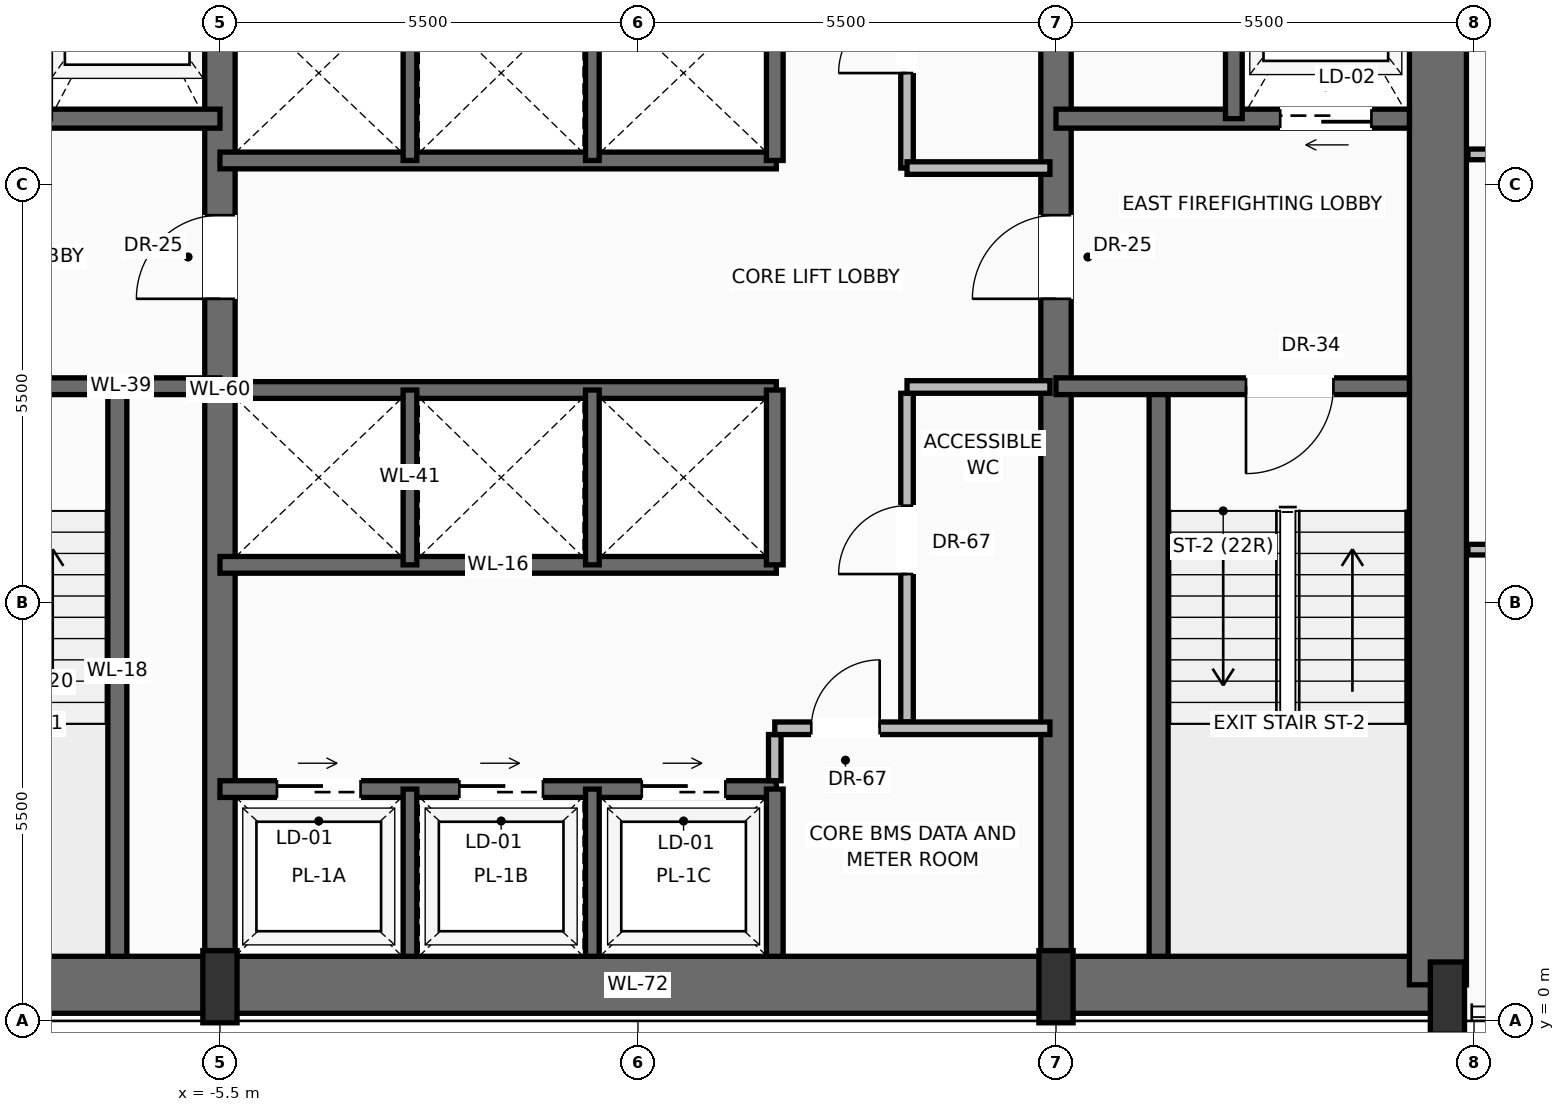
"""IFC4 building model, lengths in metres.
Left out: names, types, materials, properties, quantities, classifications, styles, units other than length and angle.
Written with IfcOpenShell. Run it as: python <this file> out.ifc"""

import sys

from ifc_helpers import new_model, si_unit, direction, frame, frame_2d, origin, origin_2d, place, context, subcontext, project, spatial, rectangle, extrude, source, transform, mapped, element, fill, save


model = new_model("IFC4")
c1 = context("Model", 3, precision=1e-05, world=origin(), true_north=direction((0.0, 1.0)))
c2 = subcontext(c1, "Body", "Model", "MODEL_VIEW")
j1 = project(units=[si_unit("LENGTHUNIT", "METRE"), si_unit("PLANEANGLEUNIT", "RADIAN")], contexts=[c1])
p1 = place(None, origin())
s1 = spatial("IfcSite", under=j1, at=p1, CompositionType="ELEMENT")
p2 = place(p1, origin())
s2 = spatial("IfcBuilding", under=s1, at=p2, CompositionType="ELEMENT")
p3 = place(p2, frame((0.0, 0.0, 87.7)))
s3 = spatial("IfcBuildingStorey", under=s2, at=p3, CompositionType="ELEMENT", Elevation=87.7)
p4 = place(p3, frame((-10.65, 0.475, 0.0), z_axis=(0.0, 0.0, 1.0), x_axis=(1.0, 0.0, 0.0)))
e1 = element("IfcWall", 1, at=p4, inside=s3, PredefinedType="SHEAR", context=c2, shape_type="SweptSolid", body=[
    extrude(rectangle(XDim=21.3, YDim=0.75, at=frame_2d((10.65, 0.0))), origin(), (0.0, 0.0, 1.0), 3.45),
])
p5 = place(p3, frame((10.525, 0.475, 0.0), z_axis=(0.0, 0.0, 1.0), x_axis=(0.0, 1.0, 0.0)))
e2 = element("IfcWall", 2, at=p5, inside=s3, PredefinedType="SHEAR", context=c2, shape_type="SweptSolid", body=[
    extrude(rectangle(XDim=15.65, YDim=0.75, at=frame_2d((7.825, 0.0))), origin(), (0.0, 0.0, 1.0), 3.45),
])
p6 = place(p3, frame((-5.5, 0.475, 0.0), z_axis=(0.0, 0.0, 1.0), x_axis=(0.0, 1.0, 0.0)))
e3 = element("IfcWall", 3, at=p6, inside=s3, PredefinedType="SHEAR", context=c2, shape_type="SweptSolid", body=[
    extrude(rectangle(XDim=15.65, YDim=0.4, at=frame_2d((7.825, 0.0))), origin(), (0.0, 0.0, 1.0), 3.45),
])
p7 = place(p6, frame((9.025, 0.0, 0.0)))
e4 = element("IfcOpeningElement", 4, at=p7, cuts=e3, PredefinedType="OPENING", context=c2, shape_type="SweptSolid", body=[
    extrude(rectangle(XDim=1.1, YDim=2.2, at=frame_2d((0.55, 1.1))), frame((0.0, 0.21, 0.0), z_axis=(0.0, -1.0, 0.0), x_axis=(1.0, 0.0, 0.0)), (0.0, 0.0, 1.0), 0.42),
])
p8 = place(p3, frame((5.5, 0.475, 0.0), z_axis=(0.0, 0.0, 1.0), x_axis=(0.0, 1.0, 0.0)))
e5 = element("IfcWall", 5, at=p8, inside=s3, PredefinedType="SHEAR", context=c2, shape_type="SweptSolid", body=[
    extrude(rectangle(XDim=15.65, YDim=0.4, at=frame_2d((7.825, 0.0))), origin(), (0.0, 0.0, 1.0), 3.45),
])
p9 = place(p8, frame((9.025, 0.0, 0.0)))
e6 = element("IfcOpeningElement", 6, at=p9, cuts=e5, PredefinedType="OPENING", context=c2, shape_type="SweptSolid", body=[
    extrude(rectangle(XDim=1.1, YDim=2.2, at=frame_2d((0.55, 1.1))), frame((0.0, 0.21, 0.0), z_axis=(0.0, -1.0, 0.0), x_axis=(1.0, 0.0, 0.0)), (0.0, 0.0, 1.0), 0.42),
])
m1 = source(origin(), c2, "Body", "SweptSolid", [
    extrude(rectangle(XDim=0.45, YDim=0.95, at=origin_2d()), origin(), (0.0, 0.0, 1.0), 3.7),
])
for number, where, z_axis, x_axis in (
    (7, (-5.5, 0.45, 0.0), (0.0, 0.0, 1.0), (1.0, 0.0, 0.0)),
    (8, (5.5, 0.45, 0.0), (0.0, 0.0, 1.0), (1.0, 0.0, 0.0)),
    (9, (10.65, 0.3, 0.0), (0.0, 0.0, 1.0), (1.0, 0.0, 0.0)),
):
    element("IfcColumn", number, at=place(p3, frame(where, z_axis=z_axis, x_axis=x_axis)), inside=s3, PredefinedType="PILASTER", context=c2, shape_type="MappedRepresentation", body=[
        mapped(m1, transform((0.0, 0.0, 0.0), scale=1.0)),
    ])
p10 = place(p3, frame((-6.85, 0.85, 0.0), z_axis=(0.0, 0.0, 1.0), x_axis=(0.0, 1.0, 0.0)))
e10 = element("IfcWall", 10, at=p10, inside=s3, PredefinedType="SOLIDWALL", context=c2, shape_type="SweptSolid", body=[
    extrude(rectangle(XDim=7.5, YDim=0.25, at=frame_2d((3.75, 0.0))), origin(), (0.0, 0.0, 1.0), 3.45),
])
p11 = place(p3, frame((-5.5, 8.35, 0.0), z_axis=(0.0, 0.0, 1.0), x_axis=(-1.0, 0.0, 0.0)))
e11 = element("IfcWall", 11, at=p11, inside=s3, PredefinedType="SOLIDWALL", context=c2, shape_type="SweptSolid", body=[
    extrude(rectangle(XDim=4.65, YDim=0.22, at=frame_2d((2.325, 0.0))), origin(), (0.0, 0.0, 1.0), 3.45),
])
p12 = place(p11, frame((2.5, 0.0, 0.0)))
e12 = element("IfcOpeningElement", 12, at=p12, cuts=e11, PredefinedType="OPENING", context=c2, shape_type="SweptSolid", body=[
    extrude(rectangle(XDim=1.15, YDim=2.2, at=frame_2d((0.575, 1.1))), frame((0.0, 0.12, 0.0), z_axis=(0.0, -1.0, 0.0), x_axis=(1.0, 0.0, 0.0)), (0.0, 0.0, 1.0), 0.24),
])
p13 = place(p3, frame((-5.5, 11.87, 0.0), z_axis=(0.0, 0.0, 1.0), x_axis=(-1.0, 0.0, 0.0)))
e13 = element("IfcWall", 13, at=p13, inside=s3, PredefinedType="SOLIDWALL", context=c2, shape_type="SweptSolid", body=[
    extrude(rectangle(XDim=4.65, YDim=0.25, at=frame_2d((2.325, 0.0))), origin(), (0.0, 0.0, 1.0), 3.45),
])
p14 = place(p13, frame((2.95, 0.0, 0.0)))
e14 = element("IfcOpeningElement", 14, at=p14, cuts=e13, PredefinedType="OPENING", context=c2, shape_type="SweptSolid", body=[
    extrude(rectangle(XDim=1.2, YDim=2.25, at=frame_2d((0.6, 1.125))), frame((0.0, 0.135, 0.0), z_axis=(0.0, -1.0, 0.0), x_axis=(1.0, 0.0, 0.0)), (0.0, 0.0, 1.0), 0.27),
])
p15 = place(p3, frame((6.85, 0.85, 0.0), z_axis=(0.0, 0.0, 1.0), x_axis=(0.0, 1.0, 0.0)))
e15 = element("IfcWall", 15, at=p15, inside=s3, PredefinedType="SOLIDWALL", context=c2, shape_type="SweptSolid", body=[
    extrude(rectangle(XDim=7.5, YDim=0.25, at=frame_2d((3.75, 0.0))), origin(), (0.0, 0.0, 1.0), 3.45),
])
p16 = place(p3, frame((10.15, 8.35, 0.0), z_axis=(0.0, 0.0, 1.0), x_axis=(-1.0, 0.0, 0.0)))
e16 = element("IfcWall", 16, at=p16, inside=s3, PredefinedType="SOLIDWALL", context=c2, shape_type="SweptSolid", body=[
    extrude(rectangle(XDim=4.65, YDim=0.22, at=frame_2d((2.325, 0.0))), origin(), (0.0, 0.0, 1.0), 3.45),
])
p17 = place(p16, frame((1.0, 0.0, 0.0)))
e17 = element("IfcOpeningElement", 17, at=p17, cuts=e16, PredefinedType="OPENING", context=c2, shape_type="SweptSolid", body=[
    extrude(rectangle(XDim=1.15, YDim=2.2, at=frame_2d((0.575, 1.1))), frame((0.0, 0.12, 0.0), z_axis=(0.0, -1.0, 0.0), x_axis=(1.0, 0.0, 0.0)), (0.0, 0.0, 1.0), 0.24),
])
p18 = place(p3, frame((10.15, 11.87, 0.0), z_axis=(0.0, 0.0, 1.0), x_axis=(-1.0, 0.0, 0.0)))
e18 = element("IfcWall", 18, at=p18, inside=s3, PredefinedType="SOLIDWALL", context=c2, shape_type="SweptSolid", body=[
    extrude(rectangle(XDim=4.65, YDim=0.25, at=frame_2d((2.325, 0.0))), origin(), (0.0, 0.0, 1.0), 3.45),
])
p19 = place(p18, frame((0.5, 0.0, 0.0)))
e19 = element("IfcOpeningElement", 19, at=p19, cuts=e18, PredefinedType="OPENING", context=c2, shape_type="SweptSolid", body=[
    extrude(rectangle(XDim=1.2, YDim=2.25, at=frame_2d((0.6, 1.125))), frame((0.0, 0.135, 0.0), z_axis=(0.0, -1.0, 0.0), x_axis=(1.0, 0.0, 0.0)), (0.0, 0.0, 1.0), 0.27),
])
p20 = place(p3, frame((7.84, 11.87, 0.0), z_axis=(0.0, 0.0, 1.0), x_axis=(0.0, 1.0, 0.0)))
e20 = element("IfcWall", 20, at=p20, inside=s3, PredefinedType="SOLIDWALL", context=c2, shape_type="SweptSolid", body=[
    extrude(rectangle(XDim=3.88, YDim=0.22, at=frame_2d((1.94, 0.0))), origin(), (0.0, 0.0, 1.0), 3.45),
])
p21 = place(p3, frame((-5.5, 3.05, 0.0), z_axis=(0.0, 0.0, 1.0), x_axis=(1.0, 0.0, 0.0)))
e21 = element("IfcWall", 21, at=p21, inside=s3, PredefinedType="SOLIDWALL", context=c2, shape_type="SweptSolid", body=[
    extrude(rectangle(XDim=7.32, YDim=0.22, at=frame_2d((3.66, 0.0))), origin(), (0.0, 0.0, 1.0), 3.45),
])
p22 = place(p21, frame((0.75, 0.0, 0.0)))
e22 = element("IfcOpeningElement", 22, at=p22, cuts=e21, PredefinedType="OPENING", context=c2, shape_type="SweptSolid", body=[
    extrude(rectangle(XDim=1.1, YDim=2.2, at=frame_2d((0.55, 1.1))), frame((0.0, 0.12, 0.0), z_axis=(0.0, -1.0, 0.0), x_axis=(1.0, 0.0, 0.0)), (0.0, 0.0, 1.0), 0.24),
])
p23 = place(p21, frame((3.15, 0.0, 0.0)))
e23 = element("IfcOpeningElement", 23, at=p23, cuts=e21, PredefinedType="OPENING", context=c2, shape_type="SweptSolid", body=[
    extrude(rectangle(XDim=1.1, YDim=2.2, at=frame_2d((0.55, 1.1))), frame((0.0, 0.12, 0.0), z_axis=(0.0, -1.0, 0.0), x_axis=(1.0, 0.0, 0.0)), (0.0, 0.0, 1.0), 0.24),
])
p24 = place(p21, frame((5.55, 0.0, 0.0)))
e24 = element("IfcOpeningElement", 24, at=p24, cuts=e21, PredefinedType="OPENING", context=c2, shape_type="SweptSolid", body=[
    extrude(rectangle(XDim=1.1, YDim=2.2, at=frame_2d((0.55, 1.1))), frame((0.0, 0.12, 0.0), z_axis=(0.0, -1.0, 0.0), x_axis=(1.0, 0.0, 0.0)), (0.0, 0.0, 1.0), 0.24),
])
p25 = place(p3, frame((1.8, 0.85, 0.0), z_axis=(0.0, 0.0, 1.0), x_axis=(0.0, 1.0, 0.0)))
e25 = element("IfcWall", 25, at=p25, inside=s3, PredefinedType="SOLIDWALL", context=c2, shape_type="SweptSolid", body=[
    extrude(rectangle(XDim=2.2, YDim=0.22, at=frame_2d((1.1, 0.0))), origin(), (0.0, 0.0, 1.0), 3.45),
])
for number, where, z_axis, x_axis in (
    (26, (-3.0, 0.85, 0.0), (0.0, 0.0, 1.0), (0.0, 1.0, 0.0)),
    (27, (-0.6, 0.85, 0.0), (0.0, 0.0, 1.0), (0.0, 1.0, 0.0)),
):
    element("IfcWall", number, at=place(p3, frame(where, z_axis=z_axis, x_axis=x_axis)), inside=s3, PredefinedType="SOLIDWALL", context=c2, shape_type="SweptSolid", body=[
        extrude(rectangle(XDim=2.2, YDim=0.18, at=frame_2d((1.1, 0.0))), origin(), (0.0, 0.0, 1.0), 3.45),
    ])
p26 = place(p3, frame((1.8, 3.16, 0.0), z_axis=(0.0, 0.0, 1.0), x_axis=(0.0, 1.0, 0.0)))
e28 = element("IfcWall", 28, at=p26, inside=s3, PredefinedType="PARTITIONING", context=c2, shape_type="SweptSolid", body=[
    extrude(rectangle(XDim=0.608, YDim=0.165, at=frame_2d((0.304, 0.0))), origin(), (0.0, 0.0, 1.0), 3.442),
])
p27 = place(p3, frame((3.54, 3.933, 0.0), z_axis=(0.0, 0.0, 1.0), x_axis=(0.0, 1.0, 0.0)))
e29 = element("IfcWall", 29, at=p27, inside=s3, PredefinedType="PARTITIONING", context=c2, shape_type="SweptSolid", body=[
    extrude(rectangle(XDim=4.325, YDim=0.165, at=frame_2d((2.163, 0.0))), origin(), (0.0, 0.0, 1.0), 3.442),
])
p28 = place(p27, frame((1.946, 0.0, 0.0)))
e30 = element("IfcOpeningElement", 30, at=p28, cuts=e29, PredefinedType="OPENING", context=c2, shape_type="SweptSolid", body=[
    extrude(rectangle(XDim=0.9, YDim=2.1, at=frame_2d((0.45, 1.05))), frame((0.0, 0.093, 0.0), z_axis=(0.0, -1.0, 0.0), x_axis=(1.0, 0.0, 0.0)), (0.0, 0.0, 1.0), 0.185),
])
p29 = place(p3, frame((3.54, 8.34, 0.0), z_axis=(0.0, 0.0, 1.0), x_axis=(1.0, 0.0, 0.0)))
e31 = element("IfcWall", 31, at=p29, inside=s3, PredefinedType="PARTITIONING", context=c2, shape_type="SweptSolid", body=[
    extrude(rectangle(XDim=1.88, YDim=0.165, at=frame_2d((0.94, 0.0))), origin(), (0.0, 0.0, 1.0), 3.442),
])
p30 = place(p3, frame((1.8, 3.85, 0.0), z_axis=(0.0, 0.0, 1.0), x_axis=(1.0, 0.0, 0.0)))
e32 = element("IfcWall", 32, at=p30, inside=s3, PredefinedType="PARTITIONING", context=c2, shape_type="SweptSolid", body=[
    extrude(rectangle(XDim=3.62, YDim=0.165, at=frame_2d((1.81, 0.0))), origin(), (0.0, 0.0, 1.0), 3.442),
])
p31 = place(p30, frame((0.48, 0.0, 0.0)))
e33 = element("IfcOpeningElement", 33, at=p31, cuts=e32, PredefinedType="OPENING", context=c2, shape_type="SweptSolid", body=[
    extrude(rectangle(XDim=0.9, YDim=2.1, at=frame_2d((0.45, 1.05))), frame((0.0, 0.093, 0.0), z_axis=(0.0, -1.0, 0.0), x_axis=(1.0, 0.0, 0.0)), (0.0, 0.0, 1.0), 0.185),
])
for number, where, z_axis, x_axis in (
    (34, (-5.5, 6.0, 0.0), (0.0, 0.0, 1.0), (1.0, 0.0, 0.0)),
    (35, (-5.5, 8.3, 0.0), (0.0, 0.0, 1.0), (1.0, 0.0, 0.0)),
):
    element("IfcWall", number, at=place(p3, frame(where, z_axis=z_axis, x_axis=x_axis)), inside=s3, PredefinedType="SOLIDWALL", context=c2, shape_type="SweptSolid", body=[
        extrude(rectangle(XDim=7.32, YDim=0.22, at=frame_2d((3.66, 0.0))), origin(), (0.0, 0.0, 1.0), 3.45),
    ])
p32 = place(p3, frame((1.8, 6.0, 0.0), z_axis=(0.0, 0.0, 1.0), x_axis=(0.0, 1.0, 0.0)))
e36 = element("IfcWall", 36, at=p32, inside=s3, PredefinedType="SOLIDWALL", context=c2, shape_type="SweptSolid", body=[
    extrude(rectangle(XDim=2.3, YDim=0.22, at=frame_2d((1.15, 0.0))), origin(), (0.0, 0.0, 1.0), 3.45),
])
for number, where, z_axis, x_axis in (
    (37, (-3.0, 6.0, 0.0), (0.0, 0.0, 1.0), (0.0, 1.0, 0.0)),
    (38, (-0.6, 6.0, 0.0), (0.0, 0.0, 1.0), (0.0, 1.0, 0.0)),
):
    element("IfcWall", number, at=place(p3, frame(where, z_axis=z_axis, x_axis=x_axis)), inside=s3, PredefinedType="SOLIDWALL", context=c2, shape_type="SweptSolid", body=[
        extrude(rectangle(XDim=2.3, YDim=0.18, at=frame_2d((1.15, 0.0))), origin(), (0.0, 0.0, 1.0), 3.45),
    ])
p33 = place(p3, frame((-5.5, 11.32, 0.0), z_axis=(0.0, 0.0, 1.0), x_axis=(1.0, 0.0, 0.0)))
e39 = element("IfcWall", 39, at=p33, inside=s3, PredefinedType="SOLIDWALL", context=c2, shape_type="SweptSolid", body=[
    extrude(rectangle(XDim=7.32, YDim=0.22, at=frame_2d((3.66, 0.0))), origin(), (0.0, 0.0, 1.0), 3.45),
])
p34 = place(p3, frame((1.8, 11.32, 0.0), z_axis=(0.0, 0.0, 1.0), x_axis=(0.0, 1.0, 0.0)))
e40 = element("IfcWall", 40, at=p34, inside=s3, PredefinedType="SOLIDWALL", context=c2, shape_type="SweptSolid", body=[
    extrude(rectangle(XDim=2.3, YDim=0.22, at=frame_2d((1.15, 0.0))), origin(), (0.0, 0.0, 1.0), 3.45),
])
for number, where, z_axis, x_axis in (
    (41, (-3.0, 11.32, 0.0), (0.0, 0.0, 1.0), (0.0, 1.0, 0.0)),
    (42, (-0.6, 11.32, 0.0), (0.0, 0.0, 1.0), (0.0, 1.0, 0.0)),
):
    element("IfcWall", number, at=place(p3, frame(where, z_axis=z_axis, x_axis=x_axis)), inside=s3, PredefinedType="SOLIDWALL", context=c2, shape_type="SweptSolid", body=[
        extrude(rectangle(XDim=2.3, YDim=0.18, at=frame_2d((1.15, 0.0))), origin(), (0.0, 0.0, 1.0), 3.45),
    ])
p35 = place(p3, frame((3.54, 11.22, 0.0), z_axis=(0.0, 0.0, 1.0), x_axis=(0.0, 1.0, 0.0)))
e43 = element("IfcWall", 43, at=p35, inside=s3, PredefinedType="PARTITIONING", context=c2, shape_type="SweptSolid", body=[
    extrude(rectangle(XDim=4.53, YDim=0.165, at=frame_2d((2.265, 0.0))), origin(), (0.0, 0.0, 1.0), 3.442),
])
p36 = place(p35, frame((1.25, 0.0, 0.0)))
e44 = element("IfcOpeningElement", 44, at=p36, cuts=e43, PredefinedType="OPENING", context=c2, shape_type="SweptSolid", body=[
    extrude(rectangle(XDim=0.9, YDim=2.1, at=frame_2d((0.45, 1.05))), frame((0.0, 0.093, 0.0), z_axis=(0.0, -1.0, 0.0), x_axis=(1.0, 0.0, 0.0)), (0.0, 0.0, 1.0), 0.185),
])
p37 = place(p3, frame((3.54, 11.22, 0.0), z_axis=(0.0, 0.0, 1.0), x_axis=(1.0, 0.0, 0.0)))
e45 = element("IfcWall", 45, at=p37, inside=s3, PredefinedType="PARTITIONING", context=c2, shape_type="SweptSolid", body=[
    extrude(rectangle(XDim=1.88, YDim=0.165, at=frame_2d((0.94, 0.0))), origin(), (0.0, 0.0, 1.0), 3.442),
])
p38 = place(p3, frame((10.92, 6.2, 0.0), z_axis=(0.0, 0.0, 1.0), x_axis=(1.0, 0.0, 0.0)))
e46 = element("IfcWall", 46, at=p38, inside=s3, PredefinedType="PARTITIONING", context=c2, shape_type="SweptSolid", body=[
    extrude(rectangle(XDim=15.189, YDim=0.14, at=frame_2d((7.594, 0.0))), origin(), (0.0, 0.0, 1.0), 2.979),
])
p39 = place(p38, frame((7.107, 0.0, 0.0)))
e47 = element("IfcOpeningElement", 47, at=p39, cuts=e46, PredefinedType="OPENING", context=c2, shape_type="SweptSolid", body=[
    extrude(rectangle(XDim=0.95, YDim=2.2, at=frame_2d((0.475, 1.1))), frame((0.0, 0.08, 0.0), z_axis=(0.0, -1.0, 0.0), x_axis=(1.0, 0.0, 0.0)), (0.0, 0.0, 1.0), 0.16),
])
p40 = place(p3, frame((10.92, 11.4, 0.0), z_axis=(0.0, 0.0, 1.0), x_axis=(1.0, 0.0, 0.0)))
e48 = element("IfcWall", 48, at=p40, inside=s3, PredefinedType="PARTITIONING", context=c2, shape_type="SweptSolid", body=[
    extrude(rectangle(XDim=15.931, YDim=0.14, at=frame_2d((7.966, 0.0))), origin(), (0.0, 0.0, 1.0), 3.442),
])
p41 = place(p40, frame((7.481, 0.0, 0.0)))
e49 = element("IfcOpeningElement", 49, at=p41, cuts=e48, PredefinedType="OPENING", context=c2, shape_type="SweptSolid", body=[
    extrude(rectangle(XDim=0.95, YDim=2.2, at=frame_2d((0.475, 1.1))), frame((0.0, 0.08, 0.0), z_axis=(0.0, -1.0, 0.0), x_axis=(1.0, 0.0, 0.0)), (0.0, 0.0, 1.0), 0.16),
])
m2 = source(origin(), c2, "Body", "SweptSolid", [
    extrude(rectangle(XDim=1.1, YDim=2.2, at=frame_2d((0.55, 1.1))), frame((0.0, 0.025, 0.0), z_axis=(0.0, -1.0, 0.0), x_axis=(1.0, 0.0, 0.0)), (0.0, 0.0, 1.0), 0.05),
])
p42 = place(p7, origin())
e50 = element("IfcDoor", 50, at=p42, inside=s3, OperationType="SINGLE_SWING_LEFT", PredefinedType="DOOR", context=c2, shape_type="MappedRepresentation", body=[
    mapped(m2, transform((0.0, 0.0, 0.0), scale=1.0)),
])
fill(e4, e50)
m3 = source(origin(), c2, "Body", "SweptSolid", [
    extrude(rectangle(XDim=1.15, YDim=2.2, at=frame_2d((0.575, 1.1))), frame((0.0, 0.025, 0.0), z_axis=(0.0, -1.0, 0.0), x_axis=(1.0, 0.0, 0.0)), (0.0, 0.0, 1.0), 0.05),
])
p43 = place(p17, origin())
e51 = element("IfcDoor", 51, at=p43, inside=s3, OperationType="SINGLE_SWING_RIGHT", PredefinedType="DOOR", context=c2, shape_type="MappedRepresentation", body=[
    mapped(m3, transform((0.0, 0.0, 0.0), scale=1.0)),
])
fill(e17, e51)
p44 = place(p9, origin())
e52 = element("IfcDoor", 52, at=p44, inside=s3, OperationType="SINGLE_SWING_LEFT", PredefinedType="DOOR", context=c2, shape_type="MappedRepresentation", body=[
    mapped(m2, transform((0.0, 0.0, 0.0), scale=1.0)),
])
fill(e6, e52)
m4 = source(origin(), c2, "Body", "SweptSolid", [
    extrude(rectangle(XDim=1.2, YDim=2.25, at=frame_2d((0.6, 1.125))), frame((0.0, 0.025, 0.0), z_axis=(0.0, -1.0, 0.0), x_axis=(1.0, 0.0, 0.0)), (0.0, 0.0, 1.0), 0.05),
])
p45 = place(p19, origin())
e53 = element("IfcDoor", 53, at=p45, inside=s3, OperationType="SLIDING_TO_RIGHT", PredefinedType="DOOR", context=c2, shape_type="MappedRepresentation", body=[
    mapped(m4, transform((0.0, 0.0, 0.0), scale=1.0)),
])
fill(e19, e53)
m5 = source(origin(), c2, "Body", "SweptSolid", [
    extrude(rectangle(XDim=1.1, YDim=2.2, at=frame_2d((0.55, 1.1))), frame((0.0, 0.025, 0.0), z_axis=(0.0, -1.0, 0.0), x_axis=(1.0, 0.0, 0.0)), (0.0, 0.0, 1.0), 0.05),
])
p46 = place(p22, origin())
e54 = element("IfcDoor", 54, at=p46, inside=s3, OperationType="SLIDING_TO_RIGHT", PredefinedType="DOOR", context=c2, shape_type="MappedRepresentation", body=[
    mapped(m5, transform((0.0, 0.0, 0.0), scale=1.0)),
])
fill(e22, e54)
p47 = place(p23, origin())
e55 = element("IfcDoor", 55, at=p47, inside=s3, OperationType="SLIDING_TO_RIGHT", PredefinedType="DOOR", context=c2, shape_type="MappedRepresentation", body=[
    mapped(m5, transform((0.0, 0.0, 0.0), scale=1.0)),
])
fill(e23, e55)
p48 = place(p24, origin())
e56 = element("IfcDoor", 56, at=p48, inside=s3, OperationType="SLIDING_TO_RIGHT", PredefinedType="DOOR", context=c2, shape_type="MappedRepresentation", body=[
    mapped(m5, transform((0.0, 0.0, 0.0), scale=1.0)),
])
fill(e24, e56)
m6 = source(origin(), c2, "Body", "SweptSolid", [
    extrude(rectangle(XDim=0.9, YDim=2.1, at=frame_2d((0.45, 1.05))), frame((0.0, 0.025, 0.0), z_axis=(0.0, -1.0, 0.0), x_axis=(1.0, 0.0, 0.0)), (0.0, 0.0, 1.0), 0.05),
])
p49 = place(p31, origin())
e57 = element("IfcDoor", 57, at=p49, inside=s3, OperationType="SINGLE_SWING_RIGHT", PredefinedType="DOOR", context=c2, shape_type="MappedRepresentation", body=[
    mapped(m6, transform((0.0, 0.0, 0.0), scale=1.0)),
])
fill(e33, e57)
p50 = place(p28, origin())
e58 = element("IfcDoor", 58, at=p50, inside=s3, OperationType="SINGLE_SWING_LEFT", PredefinedType="DOOR", context=c2, shape_type="MappedRepresentation", body=[
    mapped(m6, transform((0.0, 0.0, 0.0), scale=1.0)),
])
fill(e30, e58)
p51 = place(p36, origin())
e59 = element("IfcDoor", 59, at=p51, inside=s3, OperationType="SINGLE_SWING_LEFT", PredefinedType="DOOR", context=c2, shape_type="MappedRepresentation", body=[
    mapped(m6, transform((0.0, 0.0, 0.0), scale=1.0)),
])
fill(e44, e59)
save(model, sys.argv[1])
